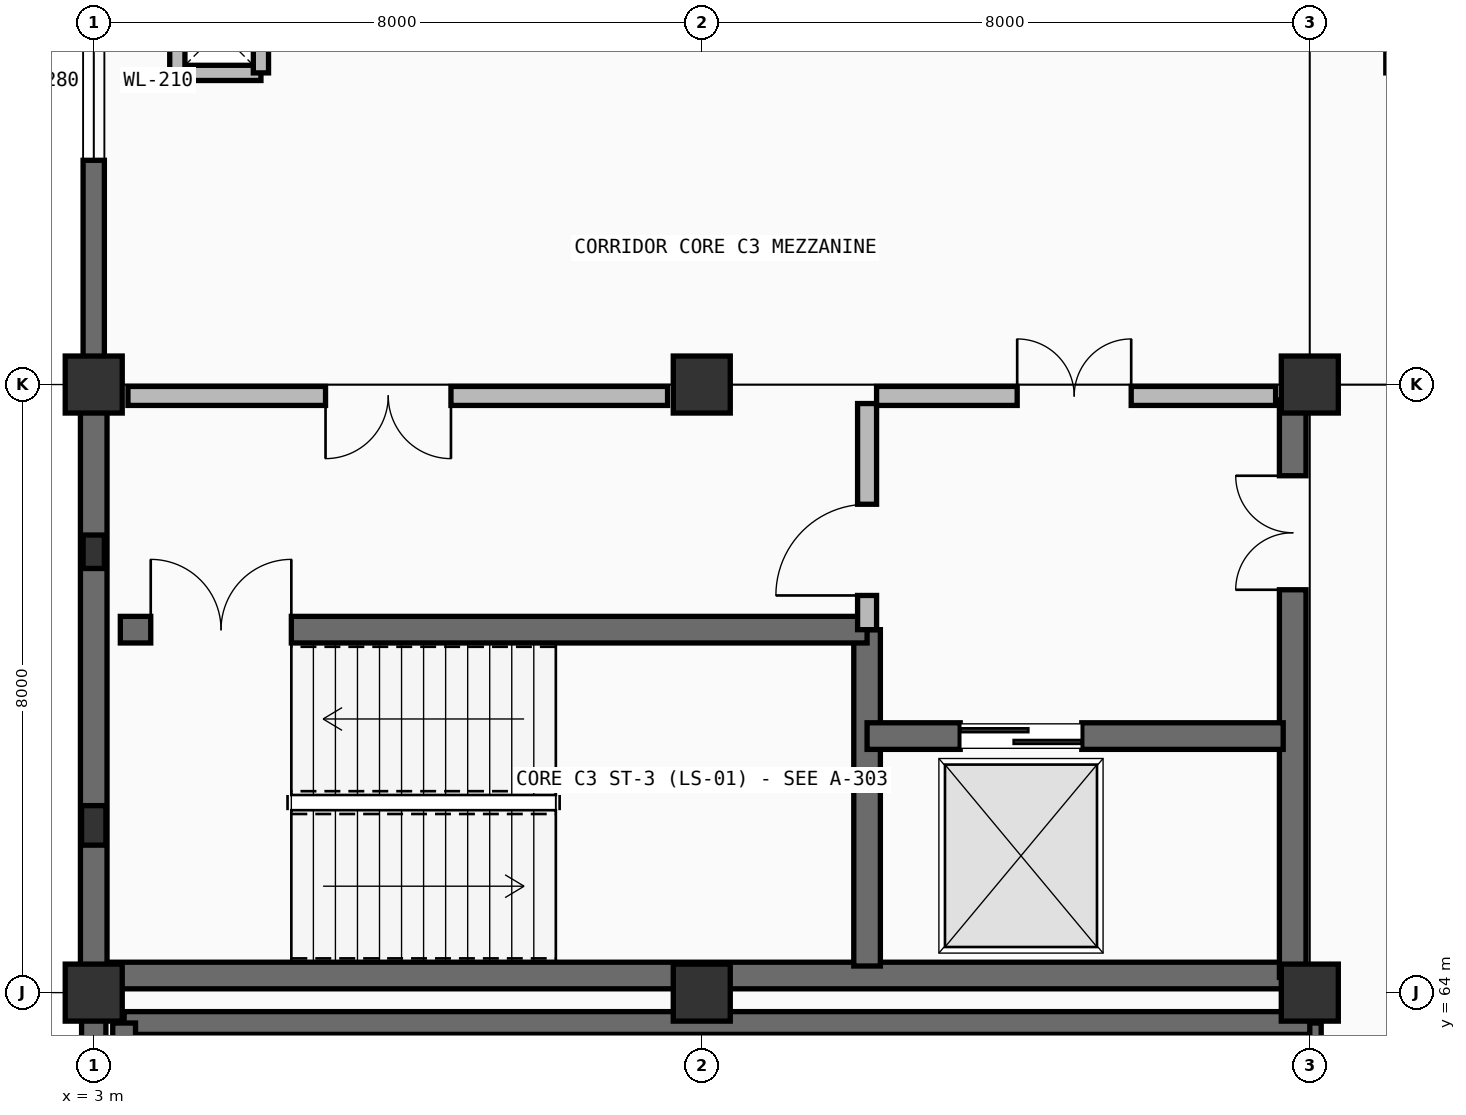
"""IFC4 building model, lengths in metres.
Left out: names, types, materials, properties, quantities, classifications, styles, units other than length and angle.
Written with IfcOpenShell. Run it as: python <this file> out.ifc"""

import sys

from ifc_helpers import new_model, si_unit, direction, frame, frame_2d, origin, origin_2d, place, context, subcontext, project, spatial, rectangle, extrude, element, fill, save


model = new_model("IFC4")
c1 = context("Model", 3, precision=1e-05, world=origin(), true_north=direction((0.0, 1.0)))
c2 = subcontext(c1, "Body", "Model", "MODEL_VIEW")
j1 = project(units=[si_unit("LENGTHUNIT", "METRE"), si_unit("PLANEANGLEUNIT", "RADIAN")], contexts=[c1])
p1 = place(None, origin())
s1 = spatial("IfcSite", under=j1, at=p1, CompositionType="ELEMENT")
p2 = place(p1, origin())
s2 = spatial("IfcBuilding", under=s1, at=p2, CompositionType="ELEMENT")
p3 = place(p2, frame((0.0, 0.0, 5.4)))
s3 = spatial("IfcBuildingStorey", under=s2, at=p3, CompositionType="ELEMENT", Elevation=5.4)
for number, where, z_axis, x_axis in (
    (1, (3.0, 64.0, 0.0), (0.0, 0.0, 1.0), (1.0, 0.0, 0.0)),
    (2, (3.0, 72.0, 0.0), (0.0, 0.0, 1.0), (1.0, 0.0, 0.0)),
    (3, (11.0, 64.0, 0.0), (0.0, 0.0, 1.0), (1.0, 0.0, 0.0)),
    (4, (11.0, 72.0, 0.0), (0.0, 0.0, 1.0), (1.0, 0.0, 0.0)),
    (5, (19.0, 64.0, 0.0), (0.0, 0.0, 1.0), (1.0, 0.0, 0.0)),
    (6, (19.0, 72.0, 0.0), (0.0, 0.0, 1.0), (1.0, 0.0, 0.0)),
):
    element("IfcColumn", number, at=place(p3, frame(where, z_axis=z_axis, x_axis=x_axis)), inside=s3, PredefinedType="COLUMN", context=c2, shape_type="SweptSolid", body=[
        extrude(rectangle(XDim=0.75, YDim=0.75, at=origin_2d()), origin(), (0.0, 0.0, 1.0), 4.5),
    ])
p4 = place(p3, frame((3.0, 66.2, 0.0), z_axis=(0.0, 0.0, 1.0), x_axis=(0.0, 1.0, 0.0)))
e7 = element("IfcColumn", 7, at=p4, inside=s3, PredefinedType="PILASTER", context=c2, shape_type="SweptSolid", body=[
    extrude(rectangle(XDim=0.52, YDim=0.32, at=origin_2d()), origin(), (0.0, 0.0, 1.0), 4.5),
])
p5 = place(p3, frame((3.0, 69.8, 0.0), z_axis=(0.0, 0.0, 1.0), x_axis=(0.0, 1.0, 0.0)))
e8 = element("IfcColumn", 8, at=p5, inside=s3, PredefinedType="PILASTER", context=c2, shape_type="SweptSolid", body=[
    extrude(rectangle(XDim=0.44, YDim=0.28, at=origin_2d()), origin(), (0.0, 0.0, 1.0), 4.5),
])
p6 = place(p3, frame((3.0, 59.0, 0.0), z_axis=(0.0, 0.0, 1.0), x_axis=(0.0, 1.0, 0.0)))
e9 = element("IfcWall", 9, at=p6, inside=s3, PredefinedType="SOLIDWALL", context=c2, shape_type="SweptSolid", body=[
    extrude(rectangle(XDim=5.0, YDim=0.32, at=frame_2d((2.5, 0.0))), origin(), (0.0, 0.0, 1.0), 4.5),
])
p7 = place(p3, frame((3.0, 64.0, 0.0), z_axis=(0.0, 0.0, 1.0), x_axis=(0.0, 1.0, 0.0)))
e10 = element("IfcWall", 10, at=p7, inside=s3, PredefinedType="SHEAR", context=c2, shape_type="SweptSolid", body=[
    extrude(rectangle(XDim=8.0, YDim=0.35, at=frame_2d((4.0, 0.0))), origin(), (0.0, 0.0, 1.0), 4.5),
])
p8 = place(p3, frame((3.0, 72.0, 0.0), z_axis=(0.0, 0.0, 1.0), x_axis=(0.0, 1.0, 0.0)))
e11 = element("IfcWall", 11, at=p8, inside=s3, PredefinedType="SOLIDWALL", context=c2, shape_type="SweptSolid", body=[
    extrude(rectangle(XDim=8.0, YDim=0.28, at=frame_2d((4.0, 0.0))), origin(), (0.0, 0.0, 1.0), 4.5),
])
p9 = place(p8, frame((2.95, 0.0, 1.1)))
e12 = element("IfcOpeningElement", 12, at=p9, cuts=e11, PredefinedType="OPENING", context=c2, shape_type="SweptSolid", body=[
    extrude(rectangle(XDim=2.1, YDim=0.95, at=frame_2d((1.05, 0.475))), frame((0.0, 0.15, 0.0), z_axis=(0.0, -1.0, 0.0), x_axis=(1.0, 0.0, 0.0)), (0.0, 0.0, 1.0), 0.3),
])
p10 = place(p3, frame((3.2, 64.225, 0.0), z_axis=(0.0, 0.0, 1.0), x_axis=(1.0, 0.0, 0.0)))
e13 = element("IfcWall", 13, at=p10, inside=s3, PredefinedType="SHEAR", context=c2, shape_type="SweptSolid", body=[
    extrude(rectangle(XDim=15.6, YDim=0.35, at=frame_2d((7.8, 0.0))), origin(), (0.0, 0.0, 1.0), 4.2),
])
p11 = place(p3, frame((13.175, 64.35, 0.0), z_axis=(0.0, 0.0, 1.0), x_axis=(0.0, 1.0, 0.0)))
e14 = element("IfcWall", 14, at=p11, inside=s3, PredefinedType="SHEAR", context=c2, shape_type="SweptSolid", body=[
    extrude(rectangle(XDim=4.425, YDim=0.35, at=frame_2d((2.212, 0.0))), origin(), (0.0, 0.0, 1.0), 4.2),
])
p12 = place(p3, frame((18.775, 64.2, 0.0), z_axis=(0.0, 0.0, 1.0), x_axis=(0.0, 1.0, 0.0)))
e15 = element("IfcWall", 15, at=p12, inside=s3, PredefinedType="SHEAR", context=c2, shape_type="SweptSolid", body=[
    extrude(rectangle(XDim=7.6, YDim=0.35, at=frame_2d((3.8, 0.0))), origin(), (0.0, 0.0, 1.0), 4.2),
])
p13 = place(p12, frame((5.1, 0.0, 0.0)))
e16 = element("IfcOpeningElement", 16, at=p13, cuts=e15, PredefinedType="OPENING", context=c2, shape_type="SweptSolid", body=[
    extrude(rectangle(XDim=1.5, YDim=2.2, at=frame_2d((0.75, 1.1))), frame((0.0, 0.185, 0.0), z_axis=(0.0, -1.0, 0.0), x_axis=(1.0, 0.0, 0.0)), (0.0, 0.0, 1.0), 0.37),
])
p14 = place(p3, frame((3.35, 68.775, 0.0), z_axis=(0.0, 0.0, 1.0), x_axis=(1.0, 0.0, 0.0)))
e17 = element("IfcWall", 17, at=p14, inside=s3, PredefinedType="SHEAR", context=c2, shape_type="SweptSolid", body=[
    extrude(rectangle(XDim=9.825, YDim=0.35, at=frame_2d((4.913, 0.0))), origin(), (0.0, 0.0, 1.0), 4.2),
])
p15 = place(p14, frame((0.4, 0.0, 0.0)))
e18 = element("IfcOpeningElement", 18, at=p15, cuts=e17, PredefinedType="OPENING", context=c2, shape_type="SweptSolid", body=[
    extrude(rectangle(XDim=1.85, YDim=2.25, at=frame_2d((0.925, 1.125))), frame((0.0, 0.185, 0.0), z_axis=(0.0, -1.0, 0.0), x_axis=(1.0, 0.0, 0.0)), (0.0, 0.0, 1.0), 0.37),
])
p16 = place(p3, frame((13.175, 67.375, 0.0), z_axis=(0.0, 0.0, 1.0), x_axis=(1.0, 0.0, 0.0)))
e19 = element("IfcWall", 19, at=p16, inside=s3, PredefinedType="SHEAR", context=c2, shape_type="SweptSolid", body=[
    extrude(rectangle(XDim=5.475, YDim=0.35, at=frame_2d((2.737, 0.0))), origin(), (0.0, 0.0, 1.0), 4.2),
])
p17 = place(p16, frame((1.225, 0.0, 0.0)))
e20 = element("IfcOpeningElement", 20, at=p17, cuts=e19, PredefinedType="OPENING", context=c2, shape_type="SweptSolid", body=[
    extrude(rectangle(XDim=1.6, YDim=2.4, at=frame_2d((0.8, 1.2))), frame((0.0, 0.185, 0.0), z_axis=(0.0, -1.0, 0.0), x_axis=(1.0, 0.0, 0.0)), (0.0, 0.0, 1.0), 0.37),
])
p18 = place(p3, frame((13.175, 68.775, 0.0), z_axis=(0.0, 0.0, 1.0), x_axis=(0.0, 1.0, 0.0)))
e21 = element("IfcWall", 21, at=p18, inside=s3, PredefinedType="PARTITIONING", context=c2, shape_type="SweptSolid", body=[
    extrude(rectangle(XDim=2.975, YDim=0.25, at=frame_2d((1.488, 0.0))), origin(), (0.0, 0.0, 1.0), 4.2),
])
p19 = place(p18, frame((0.45, 0.0, 0.0)))
e22 = element("IfcOpeningElement", 22, at=p19, cuts=e21, PredefinedType="OPENING", context=c2, shape_type="SweptSolid", body=[
    extrude(rectangle(XDim=1.2, YDim=2.2, at=frame_2d((0.6, 1.1))), frame((0.0, 0.135, 0.0), z_axis=(0.0, -1.0, 0.0), x_axis=(1.0, 0.0, 0.0)), (0.0, 0.0, 1.0), 0.27),
])
p20 = place(p3, frame((3.45, 71.85, 0.0), z_axis=(0.0, 0.0, 1.0), x_axis=(1.0, 0.0, 0.0)))
e23 = element("IfcWall", 23, at=p20, inside=s3, PredefinedType="PARTITIONING", context=c2, shape_type="SweptSolid", body=[
    extrude(rectangle(XDim=7.1, YDim=0.25, at=frame_2d((3.55, 0.0))), origin(), (0.0, 0.0, 1.0), 3.435),
])
p21 = place(p20, frame((2.6, 0.0, 0.0)))
e24 = element("IfcOpeningElement", 24, at=p21, cuts=e23, PredefinedType="OPENING", context=c2, shape_type="SweptSolid", body=[
    extrude(rectangle(XDim=1.65, YDim=2.25, at=frame_2d((0.825, 1.125))), frame((0.0, 0.135, 0.0), z_axis=(0.0, -1.0, 0.0), x_axis=(1.0, 0.0, 0.0)), (0.0, 0.0, 1.0), 0.27),
])
p22 = place(p3, frame((13.3, 71.85, 0.0), z_axis=(0.0, 0.0, 1.0), x_axis=(1.0, 0.0, 0.0)))
e25 = element("IfcWall", 25, at=p22, inside=s3, PredefinedType="PARTITIONING", context=c2, shape_type="SweptSolid", body=[
    extrude(rectangle(XDim=5.25, YDim=0.25, at=frame_2d((2.625, 0.0))), origin(), (0.0, 0.0, 1.0), 3.435),
])
p23 = place(p22, frame((1.85, 0.0, 0.0)))
e26 = element("IfcOpeningElement", 26, at=p23, cuts=e25, PredefinedType="OPENING", context=c2, shape_type="SweptSolid", body=[
    extrude(rectangle(XDim=1.5, YDim=2.2, at=frame_2d((0.75, 1.1))), frame((0.0, 0.135, 0.0), z_axis=(0.0, -1.0, 0.0), x_axis=(1.0, 0.0, 0.0)), (0.0, 0.0, 1.0), 0.27),
])
p24 = place(p3, frame((19.0, 38.6, 0.0), z_axis=(0.0, 0.0, 1.0), x_axis=(0.0, 1.0, 0.0)))
e27 = element("IfcWall", 27, at=p24, inside=s3, PredefinedType="SHEAR", context=c2, shape_type="SweptSolid", body=[
    extrude(rectangle(XDim=25.0, YDim=0.3, at=frame_2d((12.5, 0.0))), origin(), (0.0, 0.0, 1.0), 4.2),
])
p25 = place(p24, frame((15.484, 0.0, 0.0)))
e28 = element("IfcOpeningElement", 28, at=p25, cuts=e27, PredefinedType="OPENING", context=c2, shape_type="SweptSolid", body=[
    extrude(rectangle(XDim=1.85, YDim=2.25, at=frame_2d((0.925, 1.125))), frame((0.0, 0.16, 0.0), z_axis=(0.0, -1.0, 0.0), x_axis=(1.0, 0.0, 0.0)), (0.0, 0.0, 1.0), 0.32),
])
p26 = place(p3, frame((3.4, 63.6, 0.0), z_axis=(0.0, 0.0, 1.0), x_axis=(1.0, 0.0, 0.0)))
e29 = element("IfcWall", 29, at=p26, inside=s3, PredefinedType="SHEAR", context=c2, shape_type="SweptSolid", body=[
    extrude(rectangle(XDim=15.6, YDim=0.3, at=frame_2d((7.8, 0.0))), origin(), (0.0, 0.0, 1.0), 4.2),
])
p27 = place(p3, frame((3.4, 38.6, 0.0), z_axis=(0.0, 0.0, 1.0), x_axis=(0.0, 1.0, 0.0)))
e30 = element("IfcWall", 30, at=p27, inside=s3, PredefinedType="SHEAR", context=c2, shape_type="SweptSolid", body=[
    extrude(rectangle(XDim=25.0, YDim=0.3, at=frame_2d((12.5, 0.0))), origin(), (0.0, 0.0, 1.0), 4.2),
])
for number, where, z_axis, x_axis in (
    (31, (4.1, 76.1, 0.0), (0.0, 0.0, 1.0), (1.0, 0.0, 0.0)),
    (32, (4.1, 76.1, 0.0), (0.0, 0.0, 1.0), (0.0, 1.0, 0.0)),
    (33, (5.2, 76.1, 0.0), (0.0, 0.0, 1.0), (0.0, 1.0, 0.0)),
):
    element("IfcWall", number, at=place(p3, frame(where, z_axis=z_axis, x_axis=x_axis)), inside=s3, PredefinedType="PARTITIONING", context=c2, shape_type="SweptSolid", body=[
        extrude(rectangle(XDim=1.1, YDim=0.2, at=frame_2d((0.55, 0.0))), origin(), (0.0, 0.0, 1.0), 4.2),
    ])
p28 = place(p9, origin())
e34 = element("IfcWindow", 34, at=p28, inside=s3, PartitioningType="SINGLE_PANEL", PredefinedType="WINDOW", context=c2, shape_type="SweptSolid", body=[
    extrude(rectangle(XDim=2.1, YDim=0.95, at=frame_2d((1.05, 0.475))), frame((0.0, 0.03, 0.0), z_axis=(0.0, -1.0, 0.0), x_axis=(1.0, 0.0, 0.0)), (0.0, 0.0, 1.0), 0.06),
])
fill(e12, e34)
p29 = place(p15, origin())
e35 = element("IfcDoor", 35, at=p29, inside=s3, OperationType="DOUBLE_DOOR_SINGLE_SWING", PredefinedType="DOOR", context=c2, shape_type="SweptSolid", body=[
    extrude(rectangle(XDim=1.85, YDim=2.25, at=frame_2d((0.925, 1.125))), frame((0.0, 0.025, 0.0), z_axis=(0.0, -1.0, 0.0), x_axis=(1.0, 0.0, 0.0)), (0.0, 0.0, 1.0), 0.05),
])
fill(e18, e35)
p30 = place(p17, origin())
e36 = element("IfcDoor", 36, at=p30, inside=s3, OperationType="DOUBLE_DOOR_SLIDING", PredefinedType="DOOR", context=c2, shape_type="SweptSolid", body=[
    extrude(rectangle(XDim=1.6, YDim=2.4, at=frame_2d((0.8, 1.2))), frame((0.0, 0.025, 0.0), z_axis=(0.0, -1.0, 0.0), x_axis=(1.0, 0.0, 0.0)), (0.0, 0.0, 1.0), 0.05),
])
fill(e20, e36)
p31 = place(p19, origin())
e37 = element("IfcDoor", 37, at=p31, inside=s3, OperationType="SINGLE_SWING_LEFT", PredefinedType="DOOR", context=c2, shape_type="SweptSolid", body=[
    extrude(rectangle(XDim=1.2, YDim=2.2, at=frame_2d((0.6, 1.1))), frame((0.0, 0.025, 0.0), z_axis=(0.0, -1.0, 0.0), x_axis=(1.0, 0.0, 0.0)), (0.0, 0.0, 1.0), 0.05),
])
fill(e22, e37)
p32 = place(p21, frame((1.65, 0.0, 0.0), z_axis=(0.0, 0.0, 1.0), x_axis=(-1.0, 0.0, 0.0)))
e38 = element("IfcDoor", 38, at=p32, inside=s3, OperationType="DOUBLE_DOOR_SINGLE_SWING", PredefinedType="DOOR", context=c2, shape_type="SweptSolid", body=[
    extrude(rectangle(XDim=1.65, YDim=2.25, at=frame_2d((0.825, 1.125))), frame((0.0, 0.025, 0.0), z_axis=(0.0, -1.0, 0.0), x_axis=(1.0, 0.0, 0.0)), (0.0, 0.0, 1.0), 0.05),
])
fill(e24, e38)
p33 = place(p23, origin())
e39 = element("IfcDoor", 39, at=p33, inside=s3, OperationType="DOUBLE_DOOR_SINGLE_SWING", PredefinedType="DOOR", context=c2, shape_type="SweptSolid", body=[
    extrude(rectangle(XDim=1.5, YDim=2.2, at=frame_2d((0.75, 1.1))), frame((0.0, 0.025, 0.0), z_axis=(0.0, -1.0, 0.0), x_axis=(1.0, 0.0, 0.0)), (0.0, 0.0, 1.0), 0.05),
])
fill(e26, e39)
p34 = place(p13, origin())
e40 = element("IfcDoor", 40, at=p34, inside=s3, OperationType="DOUBLE_DOOR_SINGLE_SWING", PredefinedType="DOOR", context=c2, shape_type="SweptSolid", body=[
    extrude(rectangle(XDim=1.5, YDim=2.2, at=frame_2d((0.75, 1.1))), frame((0.0, 0.025, 0.0), z_axis=(0.0, -1.0, 0.0), x_axis=(1.0, 0.0, 0.0)), (0.0, 0.0, 1.0), 0.05),
])
fill(e16, e40)
save(model, sys.argv[1])
